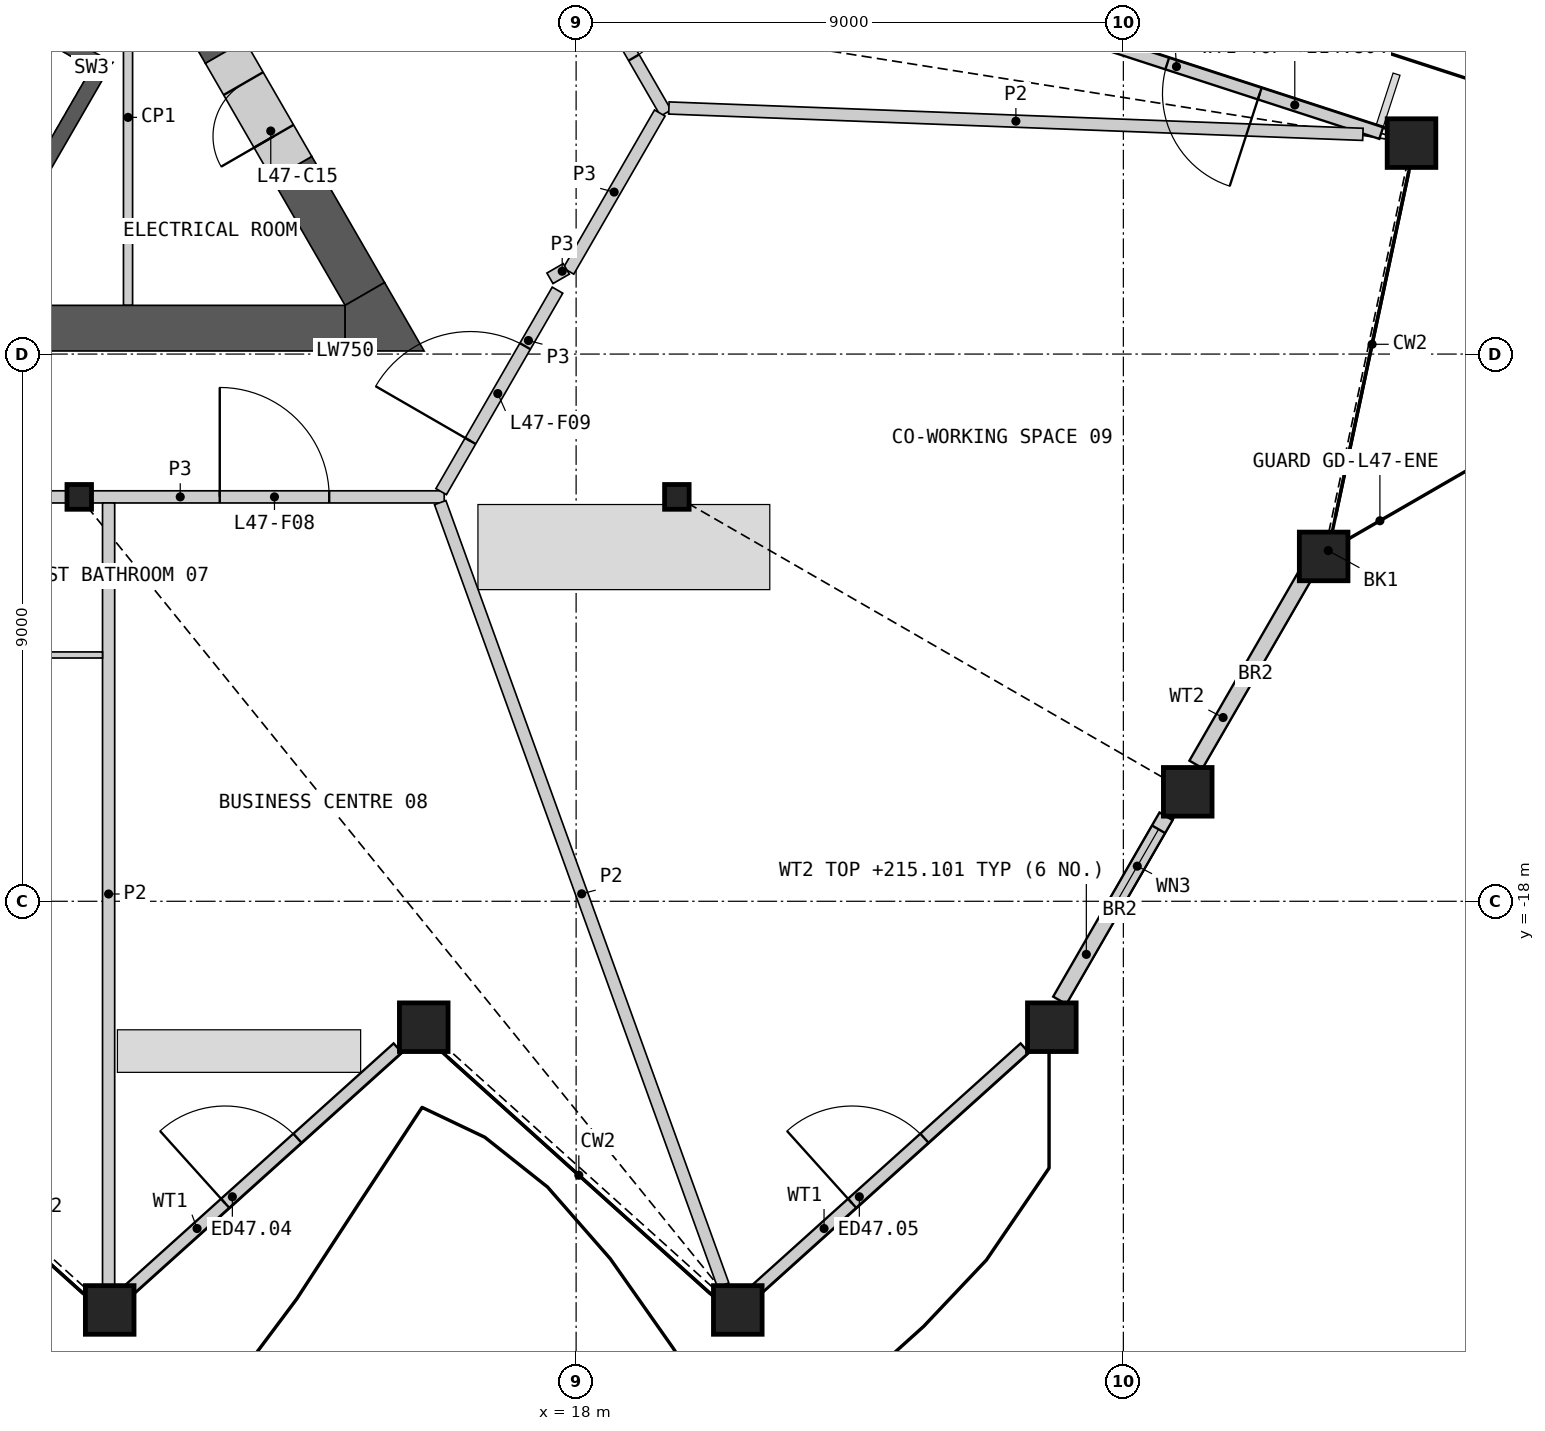
"""IFC4 building model, lengths in metres.
Left out: names, types, materials, properties, quantities, classifications, styles, units other than length and angle.
Written with IfcOpenShell. Run it as: python <this file> out.ifc"""

import sys

from ifc_helpers import new_model, si_unit, direction, frame, frame_2d, origin, origin_2d, place, context, subcontext, project, spatial, polyline, rectangle, hollow_rectangle, i_section, outline, extrude, element, fill, save


model = new_model("IFC4")
c1 = context("Model", 3, precision=1e-05, world=origin(), true_north=direction((0.0, 1.0)))
c2 = subcontext(c1, "Body", "Model", "MODEL_VIEW")
j1 = project(units=[si_unit("LENGTHUNIT", "METRE"), si_unit("PLANEANGLEUNIT", "RADIAN")], contexts=[c1])
p1 = place(None, origin())
s1 = spatial("IfcSite", under=j1, at=p1, CompositionType="ELEMENT")
p2 = place(p1, origin())
s2 = spatial("IfcBuilding", under=s1, at=p2, CompositionType="ELEMENT")
p3 = place(p2, frame((0.0, 0.0, 212.4)))
s3 = spatial("IfcBuildingStorey", under=s2, at=p3, CompositionType="ELEMENT", Elevation=212.4)
for number, where, z_axis, x_axis in (
    (1, (10.329, -24.722, 0.0), (0.0, 0.0, 1.0), (1.0, 0.0, 0.0)),
    (2, (15.494, -20.071, 0.0), (0.0, 0.0, 1.0), (1.0, 0.0, 0.0)),
    (3, (20.659, -24.722, 0.0), (0.0, 0.0, 1.0), (1.0, 0.0, 0.0)),
    (4, (25.823, -20.071, 0.0), (0.0, 0.0, 1.0), (1.0, 0.0, 0.0)),
    (5, (28.059, -16.2, 0.0), (0.0, 0.0, 1.0), (1.0, 0.0, 0.0)),
    (6, (30.294, -12.328, 0.0), (0.0, 0.0, 1.0), (1.0, 0.0, 0.0)),
    (7, (31.739, -5.53, 0.0), (0.0, 0.0, 1.0), (1.0, 0.0, 0.0)),
):
    element("IfcColumn", number, at=place(p3, frame(where, z_axis=z_axis, x_axis=x_axis)), inside=s3, PredefinedType="COLUMN", context=c2, shape_type="SweptSolid", body=[
        extrude(hollow_rectangle(XDim=0.8, YDim=0.8, WallThickness=0.05, at=origin_2d()), origin(), (0.0, 0.0, 1.0), 3.6),
    ])
for number, where, z_axis, x_axis in (
    (8, (9.828, -11.349, 0.0), (0.0, 0.0, 1.0), (1.0, 0.0, 0.0)),
    (9, (19.657, -11.349, 0.0), (0.0, 0.0, 1.0), (1.0, 0.0, 0.0)),
):
    element("IfcColumn", number, at=place(p3, frame(where, z_axis=z_axis, x_axis=x_axis)), inside=s3, PredefinedType="COLUMN", context=c2, shape_type="SweptSolid", body=[
        extrude(i_section(OverallWidth=0.404, OverallDepth=0.407, WebThickness=0.027, FlangeThickness=0.044, at=origin_2d()), origin(), (0.0, 0.0, 1.0), 3.6),
    ])
p4 = place(p3, frame((10.667, -24.373, 0.0), z_axis=(0.0, 0.0, 1.0), x_axis=(0.743154671439, 0.669119671149, 0.0)))
e10 = element("IfcWall", 10, at=p4, inside=s3, PredefinedType="SOLIDWALL", context=c2, shape_type="SweptSolid", body=[
    extrude(rectangle(XDim=5.919, YDim=0.2, at=frame_2d((2.959, 0.0))), origin(), (0.0, 0.0, 1.0), 2.701),
])
p5 = place(p4, frame((2.101, 0.0, 0.0)))
e11 = element("IfcOpeningElement", 11, at=p5, cuts=e10, PredefinedType="OPENING", context=c2, shape_type="SweptSolid", body=[
    extrude(rectangle(XDim=1.6, YDim=2.4, at=frame_2d((0.8, 1.2))), frame((0.0, 0.11, 0.0), z_axis=(0.0, -1.0, 0.0), x_axis=(1.0, 0.0, 0.0)), (0.0, 0.0, 1.0), 0.22),
])
p6 = place(p3, frame((20.978, -24.373, 0.0), z_axis=(0.0, 0.0, 1.0), x_axis=(0.743154671439, 0.669119671149, 0.0)))
e12 = element("IfcWall", 12, at=p6, inside=s3, PredefinedType="SOLIDWALL", context=c2, shape_type="SweptSolid", body=[
    extrude(rectangle(XDim=5.919, YDim=0.2, at=frame_2d((2.959, 0.0))), origin(), (0.0, 0.0, 1.0), 2.701),
])
p7 = place(p6, frame((2.101, 0.0, 0.0)))
e13 = element("IfcOpeningElement", 13, at=p7, cuts=e12, PredefinedType="OPENING", context=c2, shape_type="SweptSolid", body=[
    extrude(rectangle(XDim=1.6, YDim=2.4, at=frame_2d((0.8, 1.2))), frame((0.0, 0.11, 0.0), z_axis=(0.0, -1.0, 0.0), x_axis=(1.0, 0.0, 0.0)), (0.0, 0.0, 1.0), 0.22),
])
p8 = place(p3, frame((25.954, -19.631, 0.0), z_axis=(0.0, 0.0, 1.0), x_axis=(0.500006525586, 0.866021636203, 0.0)))
e14 = element("IfcWall", 14, at=p8, inside=s3, PredefinedType="SOLIDWALL", context=c2, shape_type="SweptSolid", body=[
    extrude(rectangle(XDim=3.497, YDim=0.25, at=frame_2d((1.748, 0.0))), origin(), (0.0, 0.0, 1.0), 2.701),
])
p9 = place(p8, frame((1.85, 0.0, 1.7)))
e15 = element("IfcOpeningElement", 15, at=p9, cuts=e14, PredefinedType="OPENING", context=c2, shape_type="SweptSolid", body=[
    extrude(rectangle(XDim=1.4, YDim=0.8, at=frame_2d((0.7, 0.4))), frame((0.0, 0.135, 0.0), z_axis=(0.0, -1.0, 0.0), x_axis=(1.0, 0.0, 0.0)), (0.0, 0.0, 1.0), 0.27),
])
p10 = place(p3, frame((28.195, -15.75, 0.0), z_axis=(0.0, 0.0, 1.0), x_axis=(0.500004952373, 0.866022544512, 0.0)))
e16 = element("IfcWall", 16, at=p10, inside=s3, PredefinedType="SOLIDWALL", context=c2, shape_type="SweptSolid", body=[
    extrude(rectangle(XDim=3.566, YDim=0.25, at=frame_2d((1.783, 0.0))), origin(), (0.0, 0.0, 1.0), 2.701),
])
p11 = place(p3, frame((31.241, -5.366, 0.0), z_axis=(0.0, 0.0, 1.0), x_axis=(-0.951052669354, 0.309028833792, 0.0)))
e17 = element("IfcWall", 17, at=p11, inside=s3, PredefinedType="SOLIDWALL", context=c2, shape_type="SweptSolid", body=[
    extrude(rectangle(XDim=5.98, YDim=0.2, at=frame_2d((2.99, 0.0))), origin(), (0.0, 0.0, 1.0), 2.404),
])
p12 = place(p11, frame((2.101, 0.0, 0.0)))
e18 = element("IfcOpeningElement", 18, at=p12, cuts=e17, PredefinedType="OPENING", context=c2, shape_type="SweptSolid", body=[
    extrude(rectangle(XDim=1.6, YDim=2.4, at=frame_2d((0.8, 1.2))), frame((0.0, 0.11, 0.0), z_axis=(0.0, -1.0, 0.0), x_axis=(1.0, 0.0, 0.0)), (0.0, 0.0, 1.0), 0.22),
])
p13 = place(p3, origin())
e19 = element("IfcWall", 19, at=p13, inside=s3, PredefinedType="SHEAR", context=c2, shape_type="SweptSolid", body=[
    extrude(outline(polyline([(8.83, -6.881), (10.374, -4.206), (10.032, -4.298), (8.738, -6.539), (8.83, -6.881)])), origin(), (0.0, 0.0, 1.0), 3.25),
])
p14 = place(p3, origin())
e20 = element("IfcWall", 20, at=p14, inside=s3, PredefinedType="SHEAR", context=c2, shape_type="SweptSolid", body=[
    extrude(outline(polyline([(10.032, -4.298), (10.374, -4.206), (5.307, -1.281), (5.182, -1.498), (10.032, -4.298)])), origin(), (0.0, 0.0, 1.0), 3.25),
])
p15 = place(p3, frame((10.631, -8.199, 0.0), z_axis=(0.0, 0.0, 1.0), x_axis=(0.0, 1.0, 0.0)))
e21 = element("IfcWall", 21, at=p15, inside=s3, PredefinedType="PARTITIONING", context=c2, shape_type="SweptSolid", body=[
    extrude(rectangle(XDim=6.184, YDim=0.15, at=frame_2d((3.092, 0.0))), origin(), (0.0, 0.0, 1.0), 3.25),
])
p16 = place(p3, frame((7.528, -8.574, 0.0), z_axis=(0.0, 0.0, 1.0), x_axis=(1.0, 0.0, 0.0)))
e22 = element("IfcWall", 22, at=p16, inside=s3, PredefinedType="SHEAR", context=c2, shape_type="SweptSolid", body=[
    extrude(rectangle(XDim=6.673, YDim=0.75, at=frame_2d((3.336, 0.0))), origin(), (0.0, 0.0, 1.0), 3.25),
])
p17 = place(p3, frame((12.228, -4.032, 0.0), z_axis=(0.0, 0.0, 1.0), x_axis=(-0.499993760127, 0.866029006347, 0.0)))
e23 = element("IfcWall", 23, at=p17, inside=s3, PredefinedType="SHEAR", context=c2, shape_type="SweptSolid", body=[
    extrude(rectangle(XDim=6.206, YDim=0.75, at=frame_2d((3.103, 0.0))), origin(), (0.0, 0.0, 1.0), 3.25),
])
p18 = place(p3, frame((14.526, -8.011, 0.0), z_axis=(0.0, 0.0, 1.0), x_axis=(-0.499943030081, 0.866058292884, 0.0)))
e24 = element("IfcWall", 24, at=p18, inside=s3, PredefinedType="SHEAR", context=c2, shape_type="SweptSolid", body=[
    extrude(rectangle(XDim=2.395, YDim=0.75, at=frame_2d((1.198, 0.0))), origin(), (0.0, 0.0, 1.0), 3.25),
])
p19 = place(p3, origin())
e25 = element("IfcWall", 25, at=p19, inside=s3, PredefinedType="SHEAR", context=c2, shape_type="SweptSolid", body=[
    extrude(outline(polyline([(14.201, -8.949), (14.201, -8.199), (14.851, -7.824), (15.5, -8.949), (14.201, -8.949)])), origin(), (0.0, 0.0, 1.0), 3.25),
])
p20 = place(p3, frame((13.328, -5.937, 0.0), z_axis=(0.0, 0.0, 1.0), x_axis=(-0.50002983664, 0.866008176907, 0.0)))
e26 = element("IfcWall", 26, at=p20, inside=s3, PredefinedType="SHEAR", context=c2, shape_type="SweptSolid", body=[
    extrude(rectangle(XDim=2.2, YDim=0.75, at=frame_2d((1.1, 0.0))), origin(), (0.0, 0.0, 1.0), 3.25),
])
p21 = place(p20, frame((0.6, 0.0, 0.0)))
e27 = element("IfcOpeningElement", 27, at=p21, cuts=e26, PredefinedType="OPENING", context=c2, shape_type="SweptSolid", body=[
    extrude(rectangle(XDim=1.0, YDim=2.1, at=frame_2d((0.5, 1.05))), frame((0.0, 0.385, 0.0), z_axis=(0.0, -1.0, 0.0), x_axis=(1.0, 0.0, 0.0)), (0.0, 0.0, 1.0), 0.77),
])
p22 = place(p3, frame((5.377, 19.385, 0.0), z_axis=(0.0, 0.0, 1.0), x_axis=(0.500000757641, -0.86602496636, 0.0)))
e28 = element("IfcWall", 28, at=p22, inside=s3, PredefinedType="PARTITIONING", context=c2, shape_type="SweptSolid", body=[
    extrude(rectangle(XDim=28.198, YDim=0.2, at=frame_2d((14.099, 0.0))), origin(), (0.0, 0.0, 1.0), 3.25),
])
p23 = place(p22, frame((25.345, 0.0, 0.0)))
e29 = element("IfcOpeningElement", 29, at=p23, cuts=e28, PredefinedType="OPENING", context=c2, shape_type="SweptSolid", body=[
    extrude(rectangle(XDim=1.8, YDim=2.1, at=frame_2d((0.9, 1.05))), frame((0.0, 0.11, 0.0), z_axis=(0.0, -1.0, 0.0), x_axis=(1.0, 0.0, 0.0)), (0.0, 0.0, 1.0), 0.22),
])
p24 = place(p22, frame((19.621, 0.0, 0.0)))
e30 = element("IfcOpeningElement", 30, at=p24, cuts=e28, PredefinedType="OPENING", context=c2, shape_type="SweptSolid", body=[
    extrude(rectangle(XDim=1.0, YDim=2.1, at=frame_2d((0.5, 1.05))), frame((0.0, 0.11, 0.0), z_axis=(0.0, -1.0, 0.0), x_axis=(1.0, 0.0, 0.0)), (0.0, 0.0, 1.0), 0.22),
])
p25 = place(p22, frame((16.409, 0.0, 0.0)))
e31 = element("IfcOpeningElement", 31, at=p25, cuts=e28, PredefinedType="OPENING", context=c2, shape_type="SweptSolid", body=[
    extrude(rectangle(XDim=1.1, YDim=2.1, at=frame_2d((0.55, 1.05))), frame((0.0, 0.11, 0.0), z_axis=(0.0, -1.0, 0.0), x_axis=(1.0, 0.0, 0.0)), (0.0, 0.0, 1.0), 0.22),
])
p26 = place(p22, frame((1.452, 0.0, 0.0)))
e32 = element("IfcOpeningElement", 32, at=p26, cuts=e28, PredefinedType="OPENING", context=c2, shape_type="SweptSolid", body=[
    extrude(rectangle(XDim=0.95, YDim=2.1, at=frame_2d((0.475, 1.05))), frame((0.0, 0.11, 0.0), z_axis=(0.0, -1.0, 0.0), x_axis=(1.0, 0.0, 0.0)), (0.0, 0.0, 1.0), 0.22),
])
p27 = place(p3, frame((0.214, -11.349, 0.0), z_axis=(0.0, 0.0, 1.0), x_axis=(1.0, 0.0, 0.0)))
e33 = element("IfcWall", 33, at=p27, inside=s3, PredefinedType="PARTITIONING", context=c2, shape_type="SweptSolid", body=[
    extrude(rectangle(XDim=9.401, YDim=0.2, at=frame_2d((4.701, 0.0))), origin(), (0.0, 0.0, 1.0), 3.25),
])
p28 = place(p27, frame((5.251, 0.0, 0.0)))
e34 = element("IfcOpeningElement", 34, at=p28, cuts=e33, PredefinedType="OPENING", context=c2, shape_type="SweptSolid", body=[
    extrude(rectangle(XDim=1.0, YDim=2.1, at=frame_2d((0.5, 1.05))), frame((0.0, 0.11, 0.0), z_axis=(0.0, -1.0, 0.0), x_axis=(1.0, 0.0, 0.0)), (0.0, 0.0, 1.0), 0.22),
])
p29 = place(p3, frame((10.042, -11.349, 0.0), z_axis=(0.0, 0.0, 1.0), x_axis=(1.0, 0.0, 0.0)))
e35 = element("IfcWall", 35, at=p29, inside=s3, PredefinedType="PARTITIONING", context=c2, shape_type="SweptSolid", body=[
    extrude(rectangle(XDim=5.789, YDim=0.2, at=frame_2d((2.894, 0.0))), origin(), (0.0, 0.0, 1.0), 3.25),
])
p30 = place(p29, frame((2.097, 0.0, 0.0)))
e36 = element("IfcOpeningElement", 36, at=p30, cuts=e35, PredefinedType="OPENING", context=c2, shape_type="SweptSolid", body=[
    extrude(rectangle(XDim=1.8, YDim=2.1, at=frame_2d((0.9, 1.05))), frame((0.0, 0.11, 0.0), z_axis=(0.0, -1.0, 0.0), x_axis=(1.0, 0.0, 0.0)), (0.0, 0.0, 1.0), 0.22),
])
p31 = place(p3, frame((15.781, -11.262, 0.0), z_axis=(0.0, 0.0, 1.0), x_axis=(0.499989446428, 0.866031496806, 0.0)))
e37 = element("IfcWall", 37, at=p31, inside=s3, PredefinedType="PARTITIONING", context=c2, shape_type="SweptSolid", body=[
    extrude(rectangle(XDim=3.826, YDim=0.2, at=frame_2d((1.913, 0.0))), origin(), (0.0, 0.0, 1.0), 3.25),
])
p32 = place(p31, frame((0.962, 0.0, 0.0)))
e38 = element("IfcOpeningElement", 38, at=p32, cuts=e37, PredefinedType="OPENING", context=c2, shape_type="SweptSolid", body=[
    extrude(rectangle(XDim=1.8, YDim=2.1, at=frame_2d((0.9, 1.05))), frame((0.0, 0.11, 0.0), z_axis=(0.0, -1.0, 0.0), x_axis=(1.0, 0.0, 0.0)), (0.0, 0.0, 1.0), 0.22),
])
p33 = place(p3, frame((17.875, -7.635, 0.0), z_axis=(0.0, 0.0, 1.0), x_axis=(0.499952404951, 0.866052881055, 0.0)))
e39 = element("IfcWall", 39, at=p33, inside=s3, PredefinedType="PARTITIONING", context=c2, shape_type="SweptSolid", body=[
    extrude(rectangle(XDim=3.002, YDim=0.2, at=frame_2d((1.501, 0.0))), origin(), (0.0, 0.0, 1.0), 3.25),
])
p34 = place(p3, frame((17.57, -7.754, 0.0), z_axis=(0.0, 0.0, 1.0), x_axis=(0.866054481515, 0.499949632511, 0.0)))
e40 = element("IfcWall", 40, at=p34, inside=s3, PredefinedType="PARTITIONING", context=c2, shape_type="SweptSolid", body=[
    extrude(rectangle(XDim=0.31, YDim=0.2, at=frame_2d((0.155, 0.0))), origin(), (0.0, 0.0, 1.0), 3.25),
])
p35 = place(p3, frame((15.765, -11.443, 0.0), z_axis=(0.0, 0.0, 1.0), x_axis=(0.340057865258, -0.940404513109, 0.0)))
e41 = element("IfcWall", 41, at=p35, inside=s3, PredefinedType="PARTITIONING", context=c2, shape_type="SweptSolid", body=[
    extrude(rectangle(XDim=13.684, YDim=0.2, at=frame_2d((6.842, 0.0))), origin(), (0.0, 0.0, 1.0), 2.404),
])
p36 = place(p3, frame((10.311, -24.312, 0.0), z_axis=(0.0, 0.0, 1.0), x_axis=(0.0, 1.0, 0.0)))
e42 = element("IfcWall", 42, at=p36, inside=s3, PredefinedType="PARTITIONING", context=c2, shape_type="SweptSolid", body=[
    extrude(rectangle(XDim=12.863, YDim=0.2, at=frame_2d((6.431, 0.0))), origin(), (0.0, 0.0, 1.0), 2.404),
])
p37 = place(p3, frame((19.526, -4.953, 0.0), z_axis=(0.0, 0.0, 1.0), x_axis=(0.999279155663, -0.037962732475, 0.0)))
e43 = element("IfcWall", 43, at=p37, inside=s3, PredefinedType="PARTITIONING", context=c2, shape_type="SweptSolid", body=[
    extrude(rectangle(XDim=11.422, YDim=0.2, at=frame_2d((5.711, 0.0))), origin(), (0.0, 0.0, 1.0), 2.404),
])
p38 = place(p3, frame((7.561, -13.949, 0.0), z_axis=(0.0, 0.0, 1.0), x_axis=(1.0, 0.0, 0.0)))
e44 = element("IfcWall", 44, at=p38, inside=s3, PredefinedType="PARTITIONING", context=c2, shape_type="SweptSolid", body=[
    extrude(rectangle(XDim=2.65, YDim=0.1, at=frame_2d((1.325, 0.0))), origin(), (0.0, 0.0, 1.0), 2.404),
])
p39 = place(p38, frame((0.25, 0.0, 0.0)))
e45 = element("IfcOpeningElement", 45, at=p39, cuts=e44, PredefinedType="OPENING", context=c2, shape_type="SweptSolid", body=[
    extrude(rectangle(XDim=0.95, YDim=2.1, at=frame_2d((0.475, 1.05))), frame((0.0, 0.06, 0.0), z_axis=(0.0, -1.0, 0.0), x_axis=(1.0, 0.0, 0.0)), (0.0, 0.0, 1.0), 0.12),
])
p40 = place(p5, origin())
e46 = element("IfcDoor", 46, at=p40, inside=s3, OperationType="DOUBLE_DOOR_SINGLE_SWING", PredefinedType="DOOR", context=c2, shape_type="SweptSolid", body=[
    extrude(rectangle(XDim=1.6, YDim=2.4, at=frame_2d((0.8, 1.2))), frame((0.0, 0.025, 0.0), z_axis=(0.0, -1.0, 0.0), x_axis=(1.0, 0.0, 0.0)), (0.0, 0.0, 1.0), 0.05),
])
fill(e11, e46)
p41 = place(p7, origin())
e47 = element("IfcDoor", 47, at=p41, inside=s3, OperationType="DOUBLE_DOOR_SINGLE_SWING", PredefinedType="DOOR", context=c2, shape_type="SweptSolid", body=[
    extrude(rectangle(XDim=1.6, YDim=2.4, at=frame_2d((0.8, 1.2))), frame((0.0, 0.025, 0.0), z_axis=(0.0, -1.0, 0.0), x_axis=(1.0, 0.0, 0.0)), (0.0, 0.0, 1.0), 0.05),
])
fill(e13, e47)
p42 = place(p9, origin())
e48 = element("IfcWindow", 48, at=p42, inside=s3, PartitioningType="SINGLE_PANEL", PredefinedType="WINDOW", context=c2, shape_type="SweptSolid", body=[
    extrude(rectangle(XDim=1.4, YDim=0.8, at=frame_2d((0.7, 0.4))), frame((0.0, 0.03, 0.0), z_axis=(0.0, -1.0, 0.0), x_axis=(1.0, 0.0, 0.0)), (0.0, 0.0, 1.0), 0.06),
])
fill(e15, e48)
p43 = place(p12, origin())
e49 = element("IfcDoor", 49, at=p43, inside=s3, OperationType="DOUBLE_DOOR_SINGLE_SWING", PredefinedType="DOOR", context=c2, shape_type="SweptSolid", body=[
    extrude(rectangle(XDim=1.6, YDim=2.4, at=frame_2d((0.8, 1.2))), frame((0.0, 0.025, 0.0), z_axis=(0.0, -1.0, 0.0), x_axis=(1.0, 0.0, 0.0)), (0.0, 0.0, 1.0), 0.05),
])
fill(e18, e49)
p44 = place(p21, origin())
e50 = element("IfcDoor", 50, at=p44, inside=s3, OperationType="SINGLE_SWING_LEFT", PredefinedType="DOOR", context=c2, shape_type="SweptSolid", body=[
    extrude(rectangle(XDim=1.0, YDim=2.1, at=frame_2d((0.5, 1.05))), frame((0.0, 0.13, 0.0), z_axis=(0.0, -1.0, 0.0), x_axis=(1.0, 0.0, 0.0)), (0.0, 0.0, 1.0), 0.05),
])
fill(e27, e50)
p45 = place(p30, origin())
e51 = element("IfcDoor", 51, at=p45, inside=s3, OperationType="DOUBLE_DOOR_SINGLE_SWING", PredefinedType="DOOR", context=c2, shape_type="SweptSolid", body=[
    extrude(rectangle(XDim=1.8, YDim=2.1, at=frame_2d((0.9, 1.05))), frame((0.0, 0.025, 0.0), z_axis=(0.0, -1.0, 0.0), x_axis=(1.0, 0.0, 0.0)), (0.0, 0.0, 1.0), 0.05),
])
fill(e36, e51)
p46 = place(p32, origin())
e52 = element("IfcDoor", 52, at=p46, inside=s3, OperationType="DOUBLE_DOOR_SINGLE_SWING", PredefinedType="DOOR", context=c2, shape_type="SweptSolid", body=[
    extrude(rectangle(XDim=1.8, YDim=2.1, at=frame_2d((0.9, 1.05))), frame((0.0, 0.025, 0.0), z_axis=(0.0, -1.0, 0.0), x_axis=(1.0, 0.0, 0.0)), (0.0, 0.0, 1.0), 0.05),
])
fill(e38, e52)
p47 = place(p23, origin())
e53 = element("IfcDoor", 53, at=p47, inside=s3, OperationType="DOUBLE_DOOR_SINGLE_SWING", PredefinedType="DOOR", context=c2, shape_type="SweptSolid", body=[
    extrude(rectangle(XDim=1.8, YDim=2.1, at=frame_2d((0.9, 1.05))), frame((0.0, 0.025, 0.0), z_axis=(0.0, -1.0, 0.0), x_axis=(1.0, 0.0, 0.0)), (0.0, 0.0, 1.0), 0.05),
])
fill(e29, e53)
save(model, sys.argv[1])
